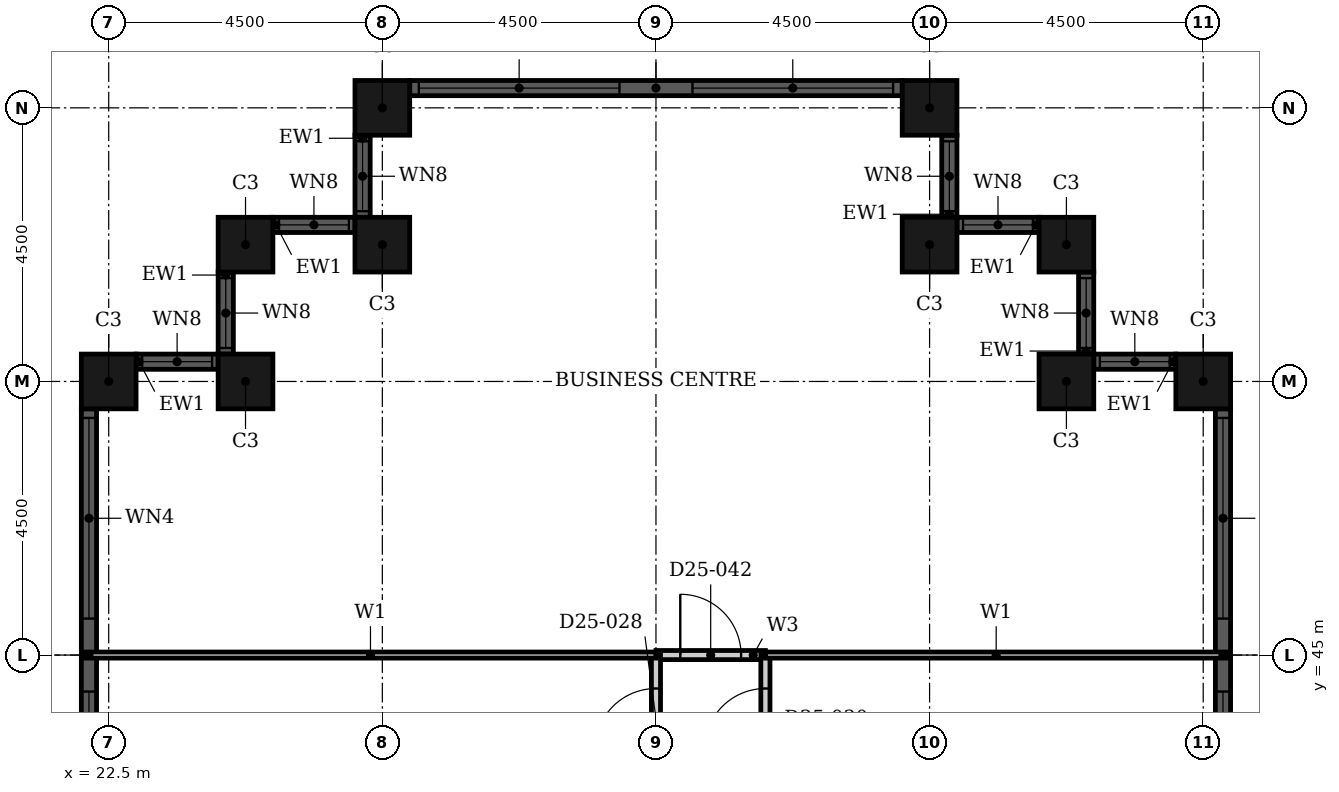
"""IFC4 building model, lengths in metres.
Left out: names, types, materials, properties, quantities, classifications, styles, units other than length and angle.
Written with IfcOpenShell. Run it as: python <this file> out.ifc"""

import sys

from ifc_helpers import new_model, si_unit, direction, frame, frame_2d, origin, origin_2d, place, context, subcontext, project, spatial, rectangle, hollow_rectangle, extrude, element, fill, save


model = new_model("IFC4")
c1 = context("Model", 3, precision=1e-05, world=origin(), true_north=direction((0.0, 1.0)))
c2 = subcontext(c1, "Body", "Model", "MODEL_VIEW")
j1 = project(units=[si_unit("LENGTHUNIT", "METRE"), si_unit("PLANEANGLEUNIT", "RADIAN")], contexts=[c1])
p1 = place(None, origin())
s1 = spatial("IfcSite", under=j1, at=p1, CompositionType="ELEMENT")
p2 = place(p1, origin())
s2 = spatial("IfcBuilding", under=s1, at=p2, CompositionType="ELEMENT")
p3 = place(p2, frame((0.0, 0.0, 104.4)))
s3 = spatial("IfcBuildingStorey", under=s2, at=p3, CompositionType="ELEMENT", Elevation=104.4)
for number, where, z_axis, x_axis in (
    (1, (40.5, 49.5, 0.0), (0.0, 0.0, 1.0), (1.0, 0.0, 0.0)),
    (2, (38.25, 49.5, 0.0), (0.0, 0.0, 1.0), (1.0, 0.0, 0.0)),
    (3, (38.25, 51.75, 0.0), (0.0, 0.0, 1.0), (1.0, 0.0, 0.0)),
    (4, (36.0, 51.75, 0.0), (0.0, 0.0, 1.0), (1.0, 0.0, 0.0)),
    (5, (36.0, 54.0, 0.0), (0.0, 0.0, 1.0), (1.0, 0.0, 0.0)),
    (6, (27.0, 54.0, 0.0), (0.0, 0.0, 1.0), (1.0, 0.0, 0.0)),
    (7, (27.0, 51.75, 0.0), (0.0, 0.0, 1.0), (1.0, 0.0, 0.0)),
    (8, (24.75, 51.75, 0.0), (0.0, 0.0, 1.0), (1.0, 0.0, 0.0)),
    (9, (24.75, 49.5, 0.0), (0.0, 0.0, 1.0), (1.0, 0.0, 0.0)),
    (10, (22.5, 49.5, 0.0), (0.0, 0.0, 1.0), (1.0, 0.0, 0.0)),
):
    element("IfcColumn", number, at=place(p3, frame(where, z_axis=z_axis, x_axis=x_axis)), inside=s3, PredefinedType="COLUMN", context=c2, shape_type="SweptSolid", body=[
        extrude(hollow_rectangle(XDim=0.9, YDim=0.9, WallThickness=0.028, at=origin_2d()), origin(), (0.0, 0.0, 1.0), 3.6),
    ])
p4 = place(p3, frame((40.825, 40.95, 0.0), z_axis=(0.0, 0.0, 1.0), x_axis=(0.0, 1.0, 0.0)))
e11 = element("IfcWall", 11, at=p4, inside=s3, PredefinedType="SOLIDWALL", context=c2, shape_type="SweptSolid", body=[
    extrude(rectangle(XDim=8.1, YDim=0.25, at=frame_2d((4.05, 0.0))), origin(), (0.0, 0.0, 1.0), 3.6),
])
p5 = place(p4, frame((0.15, 0.0, 0.9)))
e12 = element("IfcOpeningElement", 12, at=p5, cuts=e11, PredefinedType="OPENING", context=c2, shape_type="SweptSolid", body=[
    extrude(rectangle(XDim=3.3, YDim=2.08, at=frame_2d((1.65, 1.04))), frame((0.0, 0.135, 0.0), z_axis=(0.0, -1.0, 0.0), x_axis=(1.0, 0.0, 0.0)), (0.0, 0.0, 1.0), 0.27),
])
p6 = place(p4, frame((4.65, 0.0, 0.9)))
e13 = element("IfcOpeningElement", 13, at=p6, cuts=e11, PredefinedType="OPENING", context=c2, shape_type="SweptSolid", body=[
    extrude(rectangle(XDim=3.3, YDim=2.08, at=frame_2d((1.65, 1.04))), frame((0.0, 0.135, 0.0), z_axis=(0.0, -1.0, 0.0), x_axis=(1.0, 0.0, 0.0)), (0.0, 0.0, 1.0), 0.27),
])
p7 = place(p3, frame((40.05, 49.825, 0.0), z_axis=(0.0, 0.0, 1.0), x_axis=(-1.0, 0.0, 0.0)))
e14 = element("IfcWall", 14, at=p7, inside=s3, PredefinedType="SOLIDWALL", context=c2, shape_type="SweptSolid", body=[
    extrude(rectangle(XDim=1.35, YDim=0.25, at=frame_2d((0.675, 0.0))), origin(), (0.0, 0.0, 1.0), 3.6),
])
p8 = place(p7, frame((0.1, 0.0, 0.9)))
e15 = element("IfcOpeningElement", 15, at=p8, cuts=e14, PredefinedType="OPENING", context=c2, shape_type="SweptSolid", body=[
    extrude(rectangle(XDim=1.15, YDim=2.08, at=frame_2d((0.575, 1.04))), frame((0.0, 0.135, 0.0), z_axis=(0.0, -1.0, 0.0), x_axis=(1.0, 0.0, 0.0)), (0.0, 0.0, 1.0), 0.27),
])
p9 = place(p3, frame((38.575, 49.95, 0.0), z_axis=(0.0, 0.0, 1.0), x_axis=(0.0, 1.0, 0.0)))
e16 = element("IfcWall", 16, at=p9, inside=s3, PredefinedType="SOLIDWALL", context=c2, shape_type="SweptSolid", body=[
    extrude(rectangle(XDim=1.35, YDim=0.25, at=frame_2d((0.675, 0.0))), origin(), (0.0, 0.0, 1.0), 3.6),
])
p10 = place(p9, frame((0.1, 0.0, 0.9)))
e17 = element("IfcOpeningElement", 17, at=p10, cuts=e16, PredefinedType="OPENING", context=c2, shape_type="SweptSolid", body=[
    extrude(rectangle(XDim=1.15, YDim=2.08, at=frame_2d((0.575, 1.04))), frame((0.0, 0.135, 0.0), z_axis=(0.0, -1.0, 0.0), x_axis=(1.0, 0.0, 0.0)), (0.0, 0.0, 1.0), 0.27),
])
p11 = place(p3, frame((37.8, 52.075, 0.0), z_axis=(0.0, 0.0, 1.0), x_axis=(-1.0, 0.0, 0.0)))
e18 = element("IfcWall", 18, at=p11, inside=s3, PredefinedType="SOLIDWALL", context=c2, shape_type="SweptSolid", body=[
    extrude(rectangle(XDim=1.35, YDim=0.25, at=frame_2d((0.675, 0.0))), origin(), (0.0, 0.0, 1.0), 3.6),
])
p12 = place(p11, frame((0.1, 0.0, 0.9)))
e19 = element("IfcOpeningElement", 19, at=p12, cuts=e18, PredefinedType="OPENING", context=c2, shape_type="SweptSolid", body=[
    extrude(rectangle(XDim=1.15, YDim=2.08, at=frame_2d((0.575, 1.04))), frame((0.0, 0.135, 0.0), z_axis=(0.0, -1.0, 0.0), x_axis=(1.0, 0.0, 0.0)), (0.0, 0.0, 1.0), 0.27),
])
p13 = place(p3, frame((36.325, 52.2, 0.0), z_axis=(0.0, 0.0, 1.0), x_axis=(0.0, 1.0, 0.0)))
e20 = element("IfcWall", 20, at=p13, inside=s3, PredefinedType="SOLIDWALL", context=c2, shape_type="SweptSolid", body=[
    extrude(rectangle(XDim=1.35, YDim=0.25, at=frame_2d((0.675, 0.0))), origin(), (0.0, 0.0, 1.0), 3.6),
])
p14 = place(p13, frame((0.1, 0.0, 0.9)))
e21 = element("IfcOpeningElement", 21, at=p14, cuts=e20, PredefinedType="OPENING", context=c2, shape_type="SweptSolid", body=[
    extrude(rectangle(XDim=1.15, YDim=2.08, at=frame_2d((0.575, 1.04))), frame((0.0, 0.135, 0.0), z_axis=(0.0, -1.0, 0.0), x_axis=(1.0, 0.0, 0.0)), (0.0, 0.0, 1.0), 0.27),
])
p15 = place(p3, frame((35.55, 54.325, 0.0), z_axis=(0.0, 0.0, 1.0), x_axis=(-1.0, 0.0, 0.0)))
e22 = element("IfcWall", 22, at=p15, inside=s3, PredefinedType="SOLIDWALL", context=c2, shape_type="SweptSolid", body=[
    extrude(rectangle(XDim=8.1, YDim=0.25, at=frame_2d((4.05, 0.0))), origin(), (0.0, 0.0, 1.0), 3.6),
])
p16 = place(p15, frame((0.15, 0.0, 0.9)))
e23 = element("IfcOpeningElement", 23, at=p16, cuts=e22, PredefinedType="OPENING", context=c2, shape_type="SweptSolid", body=[
    extrude(rectangle(XDim=3.3, YDim=2.08, at=frame_2d((1.65, 1.04))), frame((0.0, 0.135, 0.0), z_axis=(0.0, -1.0, 0.0), x_axis=(1.0, 0.0, 0.0)), (0.0, 0.0, 1.0), 0.27),
])
p17 = place(p15, frame((4.65, 0.0, 0.9)))
e24 = element("IfcOpeningElement", 24, at=p17, cuts=e22, PredefinedType="OPENING", context=c2, shape_type="SweptSolid", body=[
    extrude(rectangle(XDim=3.3, YDim=2.08, at=frame_2d((1.65, 1.04))), frame((0.0, 0.135, 0.0), z_axis=(0.0, -1.0, 0.0), x_axis=(1.0, 0.0, 0.0)), (0.0, 0.0, 1.0), 0.27),
])
p18 = place(p3, frame((26.675, 53.55, 0.0), z_axis=(0.0, 0.0, 1.0), x_axis=(0.0, -1.0, 0.0)))
e25 = element("IfcWall", 25, at=p18, inside=s3, PredefinedType="SOLIDWALL", context=c2, shape_type="SweptSolid", body=[
    extrude(rectangle(XDim=1.35, YDim=0.25, at=frame_2d((0.675, 0.0))), origin(), (0.0, 0.0, 1.0), 3.6),
])
p19 = place(p18, frame((0.1, 0.0, 0.9)))
e26 = element("IfcOpeningElement", 26, at=p19, cuts=e25, PredefinedType="OPENING", context=c2, shape_type="SweptSolid", body=[
    extrude(rectangle(XDim=1.15, YDim=2.08, at=frame_2d((0.575, 1.04))), frame((0.0, 0.135, 0.0), z_axis=(0.0, -1.0, 0.0), x_axis=(1.0, 0.0, 0.0)), (0.0, 0.0, 1.0), 0.27),
])
p20 = place(p3, frame((26.55, 52.075, 0.0), z_axis=(0.0, 0.0, 1.0), x_axis=(-1.0, 0.0, 0.0)))
e27 = element("IfcWall", 27, at=p20, inside=s3, PredefinedType="SOLIDWALL", context=c2, shape_type="SweptSolid", body=[
    extrude(rectangle(XDim=1.35, YDim=0.25, at=frame_2d((0.675, 0.0))), origin(), (0.0, 0.0, 1.0), 3.6),
])
p21 = place(p20, frame((0.1, 0.0, 0.9)))
e28 = element("IfcOpeningElement", 28, at=p21, cuts=e27, PredefinedType="OPENING", context=c2, shape_type="SweptSolid", body=[
    extrude(rectangle(XDim=1.15, YDim=2.08, at=frame_2d((0.575, 1.04))), frame((0.0, 0.135, 0.0), z_axis=(0.0, -1.0, 0.0), x_axis=(1.0, 0.0, 0.0)), (0.0, 0.0, 1.0), 0.27),
])
p22 = place(p3, frame((24.425, 51.3, 0.0), z_axis=(0.0, 0.0, 1.0), x_axis=(0.0, -1.0, 0.0)))
e29 = element("IfcWall", 29, at=p22, inside=s3, PredefinedType="SOLIDWALL", context=c2, shape_type="SweptSolid", body=[
    extrude(rectangle(XDim=1.35, YDim=0.25, at=frame_2d((0.675, 0.0))), origin(), (0.0, 0.0, 1.0), 3.6),
])
p23 = place(p22, frame((0.1, 0.0, 0.9)))
e30 = element("IfcOpeningElement", 30, at=p23, cuts=e29, PredefinedType="OPENING", context=c2, shape_type="SweptSolid", body=[
    extrude(rectangle(XDim=1.15, YDim=2.08, at=frame_2d((0.575, 1.04))), frame((0.0, 0.135, 0.0), z_axis=(0.0, -1.0, 0.0), x_axis=(1.0, 0.0, 0.0)), (0.0, 0.0, 1.0), 0.27),
])
p24 = place(p3, frame((24.3, 49.825, 0.0), z_axis=(0.0, 0.0, 1.0), x_axis=(-1.0, 0.0, 0.0)))
e31 = element("IfcWall", 31, at=p24, inside=s3, PredefinedType="SOLIDWALL", context=c2, shape_type="SweptSolid", body=[
    extrude(rectangle(XDim=1.35, YDim=0.25, at=frame_2d((0.675, 0.0))), origin(), (0.0, 0.0, 1.0), 3.6),
])
p25 = place(p24, frame((0.1, 0.0, 0.9)))
e32 = element("IfcOpeningElement", 32, at=p25, cuts=e31, PredefinedType="OPENING", context=c2, shape_type="SweptSolid", body=[
    extrude(rectangle(XDim=1.15, YDim=2.08, at=frame_2d((0.575, 1.04))), frame((0.0, 0.135, 0.0), z_axis=(0.0, -1.0, 0.0), x_axis=(1.0, 0.0, 0.0)), (0.0, 0.0, 1.0), 0.27),
])
p26 = place(p3, frame((22.175, 49.05, 0.0), z_axis=(0.0, 0.0, 1.0), x_axis=(0.0, -1.0, 0.0)))
e33 = element("IfcWall", 33, at=p26, inside=s3, PredefinedType="SOLIDWALL", context=c2, shape_type="SweptSolid", body=[
    extrude(rectangle(XDim=8.1, YDim=0.25, at=frame_2d((4.05, 0.0))), origin(), (0.0, 0.0, 1.0), 3.6),
])
p27 = place(p26, frame((0.15, 0.0, 0.9)))
e34 = element("IfcOpeningElement", 34, at=p27, cuts=e33, PredefinedType="OPENING", context=c2, shape_type="SweptSolid", body=[
    extrude(rectangle(XDim=3.3, YDim=2.08, at=frame_2d((1.65, 1.04))), frame((0.0, 0.135, 0.0), z_axis=(0.0, -1.0, 0.0), x_axis=(1.0, 0.0, 0.0)), (0.0, 0.0, 1.0), 0.27),
])
p28 = place(p26, frame((4.65, 0.0, 0.9)))
e35 = element("IfcOpeningElement", 35, at=p28, cuts=e33, PredefinedType="OPENING", context=c2, shape_type="SweptSolid", body=[
    extrude(rectangle(XDim=3.3, YDim=2.08, at=frame_2d((1.65, 1.04))), frame((0.0, 0.135, 0.0), z_axis=(0.0, -1.0, 0.0), x_axis=(1.0, 0.0, 0.0)), (0.0, 0.0, 1.0), 0.27),
])
p29 = place(p3, frame((31.5, 45.0, 0.0), z_axis=(0.0, 0.0, 1.0), x_axis=(1.0, 0.0, 0.0)))
e36 = element("IfcWall", 36, at=p29, inside=s3, PredefinedType="PARTITIONING", context=c2, shape_type="SweptSolid", body=[
    extrude(rectangle(XDim=1.8, YDim=0.15, at=frame_2d((0.9, 0.0))), origin(), (0.0, 0.0, 1.0), 3.3),
])
p30 = place(p29, frame((0.4, 0.0, 0.0)))
e37 = element("IfcOpeningElement", 37, at=p30, cuts=e36, PredefinedType="OPENING", context=c2, shape_type="SweptSolid", body=[
    extrude(rectangle(XDim=1.0, YDim=2.1, at=frame_2d((0.5, 1.05))), frame((0.0, 0.085, 0.0), z_axis=(0.0, -1.0, 0.0), x_axis=(1.0, 0.0, 0.0)), (0.0, 0.0, 1.0), 0.17),
])
p31 = place(p3, frame((31.5, 33.3, 0.0), z_axis=(0.0, 0.0, 1.0), x_axis=(0.0, 1.0, 0.0)))
e38 = element("IfcWall", 38, at=p31, inside=s3, PredefinedType="PARTITIONING", context=c2, shape_type="SweptSolid", body=[
    extrude(rectangle(XDim=11.7, YDim=0.15, at=frame_2d((5.85, 0.0))), origin(), (0.0, 0.0, 1.0), 2.58),
])
p32 = place(p31, frame((10.15, 0.0, 0.0)))
e39 = element("IfcOpeningElement", 39, at=p32, cuts=e38, PredefinedType="OPENING", context=c2, shape_type="SweptSolid", body=[
    extrude(rectangle(XDim=1.0, YDim=2.1, at=frame_2d((0.5, 1.05))), frame((0.0, 0.085, 0.0), z_axis=(0.0, -1.0, 0.0), x_axis=(1.0, 0.0, 0.0)), (0.0, 0.0, 1.0), 0.17),
])
p33 = place(p3, frame((33.3, 33.3, 0.0), z_axis=(0.0, 0.0, 1.0), x_axis=(0.0, 1.0, 0.0)))
e40 = element("IfcWall", 40, at=p33, inside=s3, PredefinedType="PARTITIONING", context=c2, shape_type="SweptSolid", body=[
    extrude(rectangle(XDim=11.7, YDim=0.15, at=frame_2d((5.85, 0.0))), origin(), (0.0, 0.0, 1.0), 3.3),
])
p34 = place(p33, frame((10.15, 0.0, 0.0)))
e41 = element("IfcOpeningElement", 41, at=p34, cuts=e40, PredefinedType="OPENING", context=c2, shape_type="SweptSolid", body=[
    extrude(rectangle(XDim=1.0, YDim=2.1, at=frame_2d((0.5, 1.05))), frame((0.0, 0.085, 0.0), z_axis=(0.0, -1.0, 0.0), x_axis=(1.0, 0.0, 0.0)), (0.0, 0.0, 1.0), 0.17),
])
p35 = place(p3, frame((33.3, 45.0, 0.0), z_axis=(0.0, 0.0, 1.0), x_axis=(1.0, 0.0, 0.0)))
e42 = element("IfcWall", 42, at=p35, inside=s3, PredefinedType="PARTITIONING", context=c2, shape_type="SweptSolid", body=[
    extrude(rectangle(XDim=7.59, YDim=0.1, at=frame_2d((3.795, 0.0))), origin(), (0.0, 0.0, 1.0), 3.3),
])
p36 = place(p3, frame((22.11, 45.0, 0.0), z_axis=(0.0, 0.0, 1.0), x_axis=(1.0, 0.0, 0.0)))
e43 = element("IfcWall", 43, at=p36, inside=s3, PredefinedType="PARTITIONING", context=c2, shape_type="SweptSolid", body=[
    extrude(rectangle(XDim=9.39, YDim=0.1, at=frame_2d((4.695, 0.0))), origin(), (0.0, 0.0, 1.0), 3.3),
])
p37 = place(p5, origin())
e44 = element("IfcWindow", 44, at=p37, inside=s3, PartitioningType="SINGLE_PANEL", PredefinedType="WINDOW", context=c2, shape_type="SweptSolid", body=[
    extrude(rectangle(XDim=3.3, YDim=2.08, at=frame_2d((1.65, 1.04))), frame((0.0, 0.03, 0.0), z_axis=(0.0, -1.0, 0.0), x_axis=(1.0, 0.0, 0.0)), (0.0, 0.0, 1.0), 0.06),
])
fill(e12, e44)
p38 = place(p6, origin())
e45 = element("IfcWindow", 45, at=p38, inside=s3, PartitioningType="SINGLE_PANEL", PredefinedType="WINDOW", context=c2, shape_type="SweptSolid", body=[
    extrude(rectangle(XDim=3.3, YDim=2.08, at=frame_2d((1.65, 1.04))), frame((0.0, 0.03, 0.0), z_axis=(0.0, -1.0, 0.0), x_axis=(1.0, 0.0, 0.0)), (0.0, 0.0, 1.0), 0.06),
])
fill(e13, e45)
p39 = place(p8, origin())
e46 = element("IfcWindow", 46, at=p39, inside=s3, PartitioningType="SINGLE_PANEL", PredefinedType="WINDOW", context=c2, shape_type="SweptSolid", body=[
    extrude(rectangle(XDim=1.15, YDim=2.08, at=frame_2d((0.575, 1.04))), frame((0.0, 0.03, 0.0), z_axis=(0.0, -1.0, 0.0), x_axis=(1.0, 0.0, 0.0)), (0.0, 0.0, 1.0), 0.06),
])
fill(e15, e46)
p40 = place(p10, origin())
e47 = element("IfcWindow", 47, at=p40, inside=s3, PartitioningType="SINGLE_PANEL", PredefinedType="WINDOW", context=c2, shape_type="SweptSolid", body=[
    extrude(rectangle(XDim=1.15, YDim=2.08, at=frame_2d((0.575, 1.04))), frame((0.0, 0.03, 0.0), z_axis=(0.0, -1.0, 0.0), x_axis=(1.0, 0.0, 0.0)), (0.0, 0.0, 1.0), 0.06),
])
fill(e17, e47)
p41 = place(p12, origin())
e48 = element("IfcWindow", 48, at=p41, inside=s3, PartitioningType="SINGLE_PANEL", PredefinedType="WINDOW", context=c2, shape_type="SweptSolid", body=[
    extrude(rectangle(XDim=1.15, YDim=2.08, at=frame_2d((0.575, 1.04))), frame((0.0, 0.03, 0.0), z_axis=(0.0, -1.0, 0.0), x_axis=(1.0, 0.0, 0.0)), (0.0, 0.0, 1.0), 0.06),
])
fill(e19, e48)
p42 = place(p14, origin())
e49 = element("IfcWindow", 49, at=p42, inside=s3, PartitioningType="SINGLE_PANEL", PredefinedType="WINDOW", context=c2, shape_type="SweptSolid", body=[
    extrude(rectangle(XDim=1.15, YDim=2.08, at=frame_2d((0.575, 1.04))), frame((0.0, 0.03, 0.0), z_axis=(0.0, -1.0, 0.0), x_axis=(1.0, 0.0, 0.0)), (0.0, 0.0, 1.0), 0.06),
])
fill(e21, e49)
p43 = place(p16, origin())
e50 = element("IfcWindow", 50, at=p43, inside=s3, PartitioningType="SINGLE_PANEL", PredefinedType="WINDOW", context=c2, shape_type="SweptSolid", body=[
    extrude(rectangle(XDim=3.3, YDim=2.08, at=frame_2d((1.65, 1.04))), frame((0.0, 0.03, 0.0), z_axis=(0.0, -1.0, 0.0), x_axis=(1.0, 0.0, 0.0)), (0.0, 0.0, 1.0), 0.06),
])
fill(e23, e50)
p44 = place(p17, origin())
e51 = element("IfcWindow", 51, at=p44, inside=s3, PartitioningType="SINGLE_PANEL", PredefinedType="WINDOW", context=c2, shape_type="SweptSolid", body=[
    extrude(rectangle(XDim=3.3, YDim=2.08, at=frame_2d((1.65, 1.04))), frame((0.0, 0.03, 0.0), z_axis=(0.0, -1.0, 0.0), x_axis=(1.0, 0.0, 0.0)), (0.0, 0.0, 1.0), 0.06),
])
fill(e24, e51)
p45 = place(p19, origin())
e52 = element("IfcWindow", 52, at=p45, inside=s3, PartitioningType="SINGLE_PANEL", PredefinedType="WINDOW", context=c2, shape_type="SweptSolid", body=[
    extrude(rectangle(XDim=1.15, YDim=2.08, at=frame_2d((0.575, 1.04))), frame((0.0, 0.03, 0.0), z_axis=(0.0, -1.0, 0.0), x_axis=(1.0, 0.0, 0.0)), (0.0, 0.0, 1.0), 0.06),
])
fill(e26, e52)
p46 = place(p21, origin())
e53 = element("IfcWindow", 53, at=p46, inside=s3, PartitioningType="SINGLE_PANEL", PredefinedType="WINDOW", context=c2, shape_type="SweptSolid", body=[
    extrude(rectangle(XDim=1.15, YDim=2.08, at=frame_2d((0.575, 1.04))), frame((0.0, 0.03, 0.0), z_axis=(0.0, -1.0, 0.0), x_axis=(1.0, 0.0, 0.0)), (0.0, 0.0, 1.0), 0.06),
])
fill(e28, e53)
p47 = place(p23, origin())
e54 = element("IfcWindow", 54, at=p47, inside=s3, PartitioningType="SINGLE_PANEL", PredefinedType="WINDOW", context=c2, shape_type="SweptSolid", body=[
    extrude(rectangle(XDim=1.15, YDim=2.08, at=frame_2d((0.575, 1.04))), frame((0.0, 0.03, 0.0), z_axis=(0.0, -1.0, 0.0), x_axis=(1.0, 0.0, 0.0)), (0.0, 0.0, 1.0), 0.06),
])
fill(e30, e54)
p48 = place(p25, origin())
e55 = element("IfcWindow", 55, at=p48, inside=s3, PartitioningType="SINGLE_PANEL", PredefinedType="WINDOW", context=c2, shape_type="SweptSolid", body=[
    extrude(rectangle(XDim=1.15, YDim=2.08, at=frame_2d((0.575, 1.04))), frame((0.0, 0.03, 0.0), z_axis=(0.0, -1.0, 0.0), x_axis=(1.0, 0.0, 0.0)), (0.0, 0.0, 1.0), 0.06),
])
fill(e32, e55)
p49 = place(p27, origin())
e56 = element("IfcWindow", 56, at=p49, inside=s3, PartitioningType="SINGLE_PANEL", PredefinedType="WINDOW", context=c2, shape_type="SweptSolid", body=[
    extrude(rectangle(XDim=3.3, YDim=2.08, at=frame_2d((1.65, 1.04))), frame((0.0, 0.03, 0.0), z_axis=(0.0, -1.0, 0.0), x_axis=(1.0, 0.0, 0.0)), (0.0, 0.0, 1.0), 0.06),
])
fill(e34, e56)
p50 = place(p28, origin())
e57 = element("IfcWindow", 57, at=p50, inside=s3, PartitioningType="SINGLE_PANEL", PredefinedType="WINDOW", context=c2, shape_type="SweptSolid", body=[
    extrude(rectangle(XDim=3.3, YDim=2.08, at=frame_2d((1.65, 1.04))), frame((0.0, 0.03, 0.0), z_axis=(0.0, -1.0, 0.0), x_axis=(1.0, 0.0, 0.0)), (0.0, 0.0, 1.0), 0.06),
])
fill(e35, e57)
p51 = place(p32, origin())
e58 = element("IfcDoor", 58, at=p51, inside=s3, OperationType="SINGLE_SWING_RIGHT", PredefinedType="DOOR", context=c2, shape_type="SweptSolid", body=[
    extrude(rectangle(XDim=1.0, YDim=2.1, at=frame_2d((0.5, 1.05))), frame((0.0, 0.025, 0.0), z_axis=(0.0, -1.0, 0.0), x_axis=(1.0, 0.0, 0.0)), (0.0, 0.0, 1.0), 0.05),
])
fill(e39, e58)
p52 = place(p34, origin())
e59 = element("IfcDoor", 59, at=p52, inside=s3, OperationType="SINGLE_SWING_RIGHT", PredefinedType="DOOR", context=c2, shape_type="SweptSolid", body=[
    extrude(rectangle(XDim=1.0, YDim=2.1, at=frame_2d((0.5, 1.05))), frame((0.0, 0.025, 0.0), z_axis=(0.0, -1.0, 0.0), x_axis=(1.0, 0.0, 0.0)), (0.0, 0.0, 1.0), 0.05),
])
fill(e41, e59)
p53 = place(p30, origin())
e60 = element("IfcDoor", 60, at=p53, inside=s3, OperationType="SINGLE_SWING_RIGHT", PredefinedType="DOOR", context=c2, shape_type="SweptSolid", body=[
    extrude(rectangle(XDim=1.0, YDim=2.1, at=frame_2d((0.5, 1.05))), frame((0.0, 0.025, 0.0), z_axis=(0.0, -1.0, 0.0), x_axis=(1.0, 0.0, 0.0)), (0.0, 0.0, 1.0), 0.05),
])
fill(e37, e60)
save(model, sys.argv[1])
